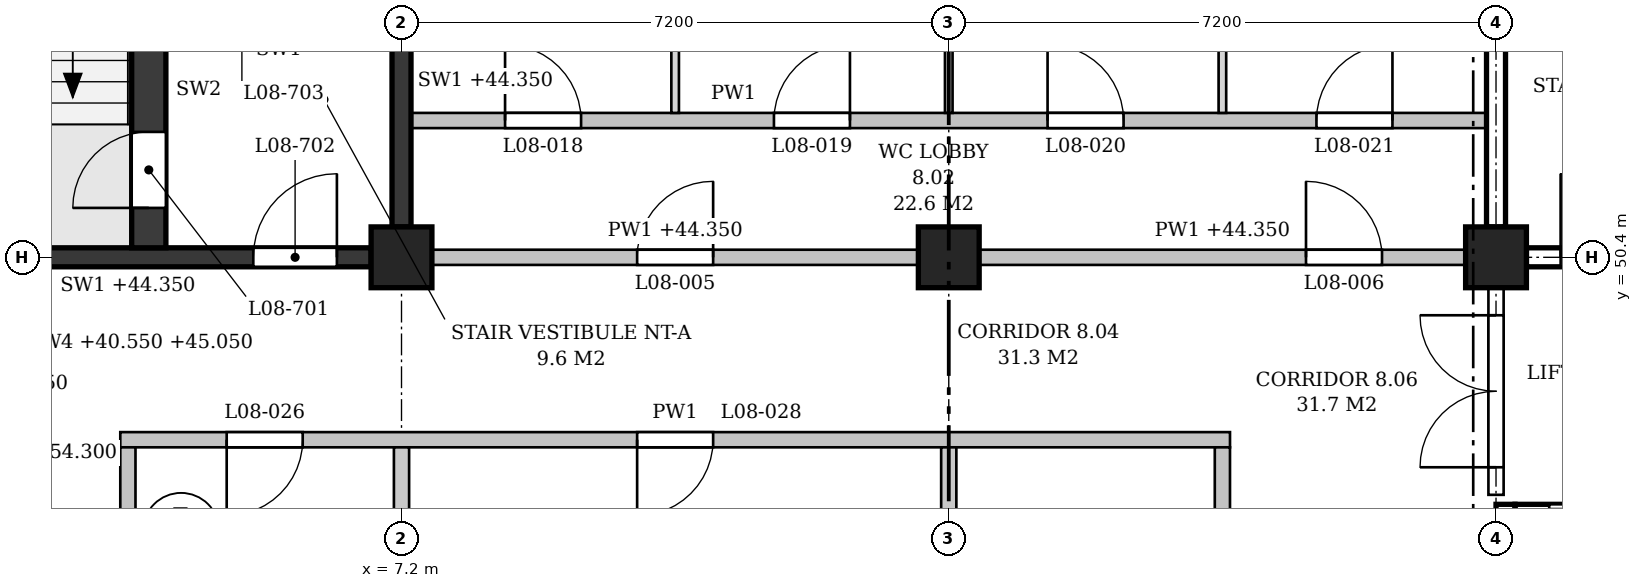
"""IFC4 building model, lengths in metres.
Left out: names, types, materials, properties, quantities, classifications, styles, units other than length and angle.
Written with IfcOpenShell. Run it as: python <this file> out.ifc"""

import sys

from ifc_helpers import new_model, si_unit, direction, frame, frame_2d, origin, origin_2d, place, context, subcontext, project, spatial, polyline, rectangle, outline, extrude, element, fill, save


model = new_model("IFC4")
c1 = context("Model", 3, precision=1e-05, world=origin(), true_north=direction((0.0, 1.0)))
c2 = subcontext(c1, "Body", "Model", "MODEL_VIEW")
j1 = project(units=[si_unit("LENGTHUNIT", "METRE"), si_unit("PLANEANGLEUNIT", "RADIAN")], contexts=[c1])
p1 = place(None, origin())
s1 = spatial("IfcSite", under=j1, at=p1, CompositionType="ELEMENT")
p2 = place(p1, origin())
s2 = spatial("IfcBuilding", under=s1, at=p2, CompositionType="ELEMENT")
p3 = place(p2, frame((0.0, 0.0, 40.8)))
s3 = spatial("IfcBuildingStorey", under=s2, at=p3, CompositionType="ELEMENT", Elevation=40.8)
for number, where, z_axis, x_axis in (
    (1, (7.2, 50.4, 0.0), (0.0, 0.0, 1.0), (1.0, 0.0, 0.0)),
    (2, (14.4, 50.4, 0.0), (0.0, 0.0, 1.0), (1.0, 0.0, 0.0)),
    (3, (21.6, 50.4, 0.0), (0.0, 0.0, 1.0), (1.0, 0.0, 0.0)),
):
    element("IfcColumn", number, at=place(p3, frame(where, z_axis=z_axis, x_axis=x_axis)), inside=s3, PredefinedType="COLUMN", context=c2, shape_type="SweptSolid", body=[
        extrude(rectangle(XDim=0.8, YDim=0.8, at=origin_2d()), origin(), (0.0, 0.0, 1.0), 4.5),
    ])
p4 = place(p3, frame((0.4, 50.4, 0.0), z_axis=(0.0, 0.0, 1.0), x_axis=(1.0, 0.0, 0.0)))
e4 = element("IfcWall", 4, at=p4, inside=s3, PredefinedType="SHEAR", context=c2, shape_type="SweptSolid", body=[
    extrude(rectangle(XDim=6.4, YDim=0.25, at=frame_2d((3.2, 0.0))), origin(), (0.0, 0.0, 1.0), 3.55),
])
p5 = place(p4, frame((4.85, 0.0, 0.0)))
e5 = element("IfcOpeningElement", 5, at=p5, cuts=e4, PredefinedType="OPENING", context=c2, shape_type="SweptSolid", body=[
    extrude(rectangle(XDim=1.1, YDim=2.1, at=frame_2d((0.55, 1.05))), frame((0.0, 0.135, 0.0), z_axis=(0.0, -1.0, 0.0), x_axis=(1.0, 0.0, 0.0)), (0.0, 0.0, 1.0), 0.27),
])
p6 = place(p3, frame((7.2, 50.8, 0.0), z_axis=(0.0, 0.0, 1.0), x_axis=(0.0, 1.0, 0.0)))
e6 = element("IfcWall", 6, at=p6, inside=s3, PredefinedType="SHEAR", context=c2, shape_type="SweptSolid", body=[
    extrude(rectangle(XDim=6.4, YDim=0.25, at=frame_2d((3.2, 0.0))), origin(), (0.0, 0.0, 1.0), 3.55),
])
p7 = place(p3, frame((3.875, 50.525, 0.0), z_axis=(0.0, 0.0, 1.0), x_axis=(0.0, 1.0, 0.0)))
e7 = element("IfcWall", 7, at=p7, inside=s3, PredefinedType="SHEAR", context=c2, shape_type="SweptSolid", body=[
    extrude(rectangle(XDim=6.925, YDim=0.45, at=frame_2d((3.462, 0.0))), origin(), (0.0, 0.0, 1.0), 4.25),
])
p8 = place(p7, frame((0.525, 0.0, 0.0)))
e8 = element("IfcOpeningElement", 8, at=p8, cuts=e7, PredefinedType="OPENING", context=c2, shape_type="SweptSolid", body=[
    extrude(rectangle(XDim=1.0, YDim=2.1, at=frame_2d((0.5, 1.05))), frame((0.0, 0.235, 0.0), z_axis=(0.0, -1.0, 0.0), x_axis=(1.0, 0.0, 0.0)), (0.0, 0.0, 1.0), 0.47),
])
p9 = place(p3, frame((22.0, 50.4, 0.0), z_axis=(0.0, 0.0, 1.0), x_axis=(1.0, 0.0, 0.0)))
e9 = element("IfcWall", 9, at=p9, inside=s3, PredefinedType="SHEAR", context=c2, shape_type="SweptSolid", body=[
    extrude(rectangle(XDim=6.4, YDim=0.25, at=frame_2d((3.2, 0.0))), origin(), (0.0, 0.0, 1.0), 3.55),
])
p10 = place(p9, frame((0.45, 0.0, 0.0)))
e10 = element("IfcOpeningElement", 10, at=p10, cuts=e9, PredefinedType="OPENING", context=c2, shape_type="SweptSolid", body=[
    extrude(rectangle(XDim=1.1, YDim=2.1, at=frame_2d((0.55, 1.05))), frame((0.0, 0.135, 0.0), z_axis=(0.0, -1.0, 0.0), x_axis=(1.0, 0.0, 0.0)), (0.0, 0.0, 1.0), 0.27),
])
p11 = place(p3, frame((21.6, 50.8, 0.0), z_axis=(0.0, 0.0, 1.0), x_axis=(0.0, 1.0, 0.0)))
e11 = element("IfcWall", 11, at=p11, inside=s3, PredefinedType="SHEAR", context=c2, shape_type="SweptSolid", body=[
    extrude(rectangle(XDim=6.4, YDim=0.25, at=frame_2d((3.2, 0.0))), origin(), (0.0, 0.0, 1.0), 3.55),
])
p12 = place(p3, frame((21.725, 43.6, -0.25), z_axis=(0.0, 0.0, 1.0), x_axis=(0.0, 1.0, 0.0)))
e12 = element("IfcWall", 12, at=p12, inside=s3, PredefinedType="SHEAR", context=c2, shape_type="SweptSolid", body=[
    extrude(rectangle(XDim=3.55, YDim=0.25, at=frame_2d((1.775, 0.0))), origin(), (0.0, 0.0, 1.0), 3.8),
])
p13 = place(p3, frame((21.85, 47.025, -0.25), z_axis=(0.0, 0.0, 1.0), x_axis=(1.0, 0.0, 0.0)))
e13 = element("IfcWall", 13, at=p13, inside=s3, PredefinedType="SHEAR", context=c2, shape_type="SweptSolid", body=[
    extrude(rectangle(XDim=2.0, YDim=0.25, at=frame_2d((1.0, 0.0))), origin(), (0.0, 0.0, 1.0), 4.5),
])
p14 = place(p13, frame((0.45, 0.0, 0.25)))
e14 = element("IfcOpeningElement", 14, at=p14, cuts=e13, PredefinedType="OPENING", context=c2, shape_type="SweptSolid", body=[
    extrude(rectangle(XDim=1.1, YDim=2.1, at=frame_2d((0.55, 1.05))), frame((0.0, 0.135, 0.0), z_axis=(0.0, -1.0, 0.0), x_axis=(1.0, 0.0, 0.0)), (0.0, 0.0, 1.0), 0.27),
])
p15 = place(p3, frame((3.5, 48.0, 0.0), z_axis=(0.0, 0.0, 1.0), x_axis=(1.0, 0.0, 0.0)))
e15 = element("IfcWall", 15, at=p15, inside=s3, PredefinedType="PARTITIONING", context=c2, shape_type="SweptSolid", body=[
    extrude(outline(polyline([(0.0, 0.0), (14.6, 0.0), (14.6, 4.25), (11.125, 4.25), (11.125, 3.55), (10.675, 3.55), (10.675, 4.25), (3.925, 4.25), (3.925, 3.55), (3.475, 3.55), (3.475, 4.25), (0.0, 4.25), (0.0, 0.0)])), frame((0.0, 0.1, 0.0), z_axis=(0.0, -1.0, 0.0), x_axis=(1.0, 0.0, 0.0)), (0.0, 0.0, 1.0), 0.2),
])
p16 = place(p15, frame((1.4, 0.0, 0.0)))
e16 = element("IfcOpeningElement", 16, at=p16, cuts=e15, PredefinedType="OPENING", context=c2, shape_type="SweptSolid", body=[
    extrude(rectangle(XDim=1.0, YDim=2.1, at=frame_2d((0.5, 1.05))), frame((0.0, 0.11, 0.0), z_axis=(0.0, -1.0, 0.0), x_axis=(1.0, 0.0, 0.0)), (0.0, 0.0, 1.0), 0.22),
])
p17 = place(p15, frame((6.8, 0.0, 0.0)))
e17 = element("IfcOpeningElement", 17, at=p17, cuts=e15, PredefinedType="OPENING", context=c2, shape_type="SweptSolid", body=[
    extrude(rectangle(XDim=1.0, YDim=2.1, at=frame_2d((0.5, 1.05))), frame((0.0, 0.11, 0.0), z_axis=(0.0, -1.0, 0.0), x_axis=(1.0, 0.0, 0.0)), (0.0, 0.0, 1.0), 0.22),
])
p18 = place(p3, frame((7.6, 50.4, 0.0), z_axis=(0.0, 0.0, 1.0), x_axis=(1.0, 0.0, 0.0)))
e18 = element("IfcWall", 18, at=p18, inside=s3, PredefinedType="PARTITIONING", context=c2, shape_type="SweptSolid", body=[
    extrude(rectangle(XDim=6.4, YDim=0.2, at=frame_2d((3.2, 0.0))), origin(), (0.0, 0.0, 1.0), 3.55),
])
p19 = place(p18, frame((2.7, 0.0, 0.0)))
e19 = element("IfcOpeningElement", 19, at=p19, cuts=e18, PredefinedType="OPENING", context=c2, shape_type="SweptSolid", body=[
    extrude(rectangle(XDim=1.0, YDim=2.1, at=frame_2d((0.5, 1.05))), frame((0.0, 0.11, 0.0), z_axis=(0.0, -1.0, 0.0), x_axis=(1.0, 0.0, 0.0)), (0.0, 0.0, 1.0), 0.22),
])
p20 = place(p3, frame((14.8, 50.4, 0.0), z_axis=(0.0, 0.0, 1.0), x_axis=(1.0, 0.0, 0.0)))
e20 = element("IfcWall", 20, at=p20, inside=s3, PredefinedType="PARTITIONING", context=c2, shape_type="SweptSolid", body=[
    extrude(rectangle(XDim=6.4, YDim=0.2, at=frame_2d((3.2, 0.0))), origin(), (0.0, 0.0, 1.0), 3.55),
])
p21 = place(p20, frame((4.3, 0.0, 0.0)))
e21 = element("IfcOpeningElement", 21, at=p21, cuts=e20, PredefinedType="OPENING", context=c2, shape_type="SweptSolid", body=[
    extrude(rectangle(XDim=1.0, YDim=2.1, at=frame_2d((0.5, 1.05))), frame((0.0, 0.11, 0.0), z_axis=(0.0, -1.0, 0.0), x_axis=(1.0, 0.0, 0.0)), (0.0, 0.0, 1.0), 0.22),
])
p22 = place(p3, frame((7.325, 52.2, 0.0), z_axis=(0.0, 0.0, 1.0), x_axis=(1.0, 0.0, 0.0)))
e22 = element("IfcWall", 22, at=p22, inside=s3, PredefinedType="PARTITIONING", context=c2, shape_type="SweptSolid", body=[
    extrude(outline(polyline([(0.0, 0.0), (14.15, 0.0), (14.15, 3.55), (14.05, 3.55), (14.05, 4.25), (7.3, 4.25), (7.3, 3.55), (6.85, 3.55), (6.85, 4.25), (0.1, 4.25), (0.1, 3.55), (0.0, 3.55), (0.0, 0.0)])), frame((0.0, 0.1, 0.0), z_axis=(0.0, -1.0, 0.0), x_axis=(1.0, 0.0, 0.0)), (0.0, 0.0, 1.0), 0.2),
])
p23 = place(p22, frame((1.238, 0.0, 0.0)))
e23 = element("IfcOpeningElement", 23, at=p23, cuts=e22, PredefinedType="OPENING", context=c2, shape_type="SweptSolid", body=[
    extrude(rectangle(XDim=1.0, YDim=2.1, at=frame_2d((0.5, 1.05))), frame((0.0, 0.11, 0.0), z_axis=(0.0, -1.0, 0.0), x_axis=(1.0, 0.0, 0.0)), (0.0, 0.0, 1.0), 0.22),
])
p24 = place(p22, frame((4.775, 0.0, 0.0)))
e24 = element("IfcOpeningElement", 24, at=p24, cuts=e22, PredefinedType="OPENING", context=c2, shape_type="SweptSolid", body=[
    extrude(rectangle(XDim=1.0, YDim=2.1, at=frame_2d((0.5, 1.05))), frame((0.0, 0.11, 0.0), z_axis=(0.0, -1.0, 0.0), x_axis=(1.0, 0.0, 0.0)), (0.0, 0.0, 1.0), 0.22),
])
p25 = place(p22, frame((8.375, 0.0, 0.0)))
e25 = element("IfcOpeningElement", 25, at=p25, cuts=e22, PredefinedType="OPENING", context=c2, shape_type="SweptSolid", body=[
    extrude(rectangle(XDim=1.0, YDim=2.1, at=frame_2d((0.5, 1.05))), frame((0.0, 0.11, 0.0), z_axis=(0.0, -1.0, 0.0), x_axis=(1.0, 0.0, 0.0)), (0.0, 0.0, 1.0), 0.22),
])
p26 = place(p22, frame((11.913, 0.0, 0.0)))
e26 = element("IfcOpeningElement", 26, at=p26, cuts=e22, PredefinedType="OPENING", context=c2, shape_type="SweptSolid", body=[
    extrude(rectangle(XDim=1.0, YDim=2.1, at=frame_2d((0.5, 1.05))), frame((0.0, 0.11, 0.0), z_axis=(0.0, -1.0, 0.0), x_axis=(1.0, 0.0, 0.0)), (0.0, 0.0, 1.0), 0.22),
])
p27 = place(p3, frame((3.6, 46.8, 0.0), z_axis=(0.0, 0.0, 1.0), x_axis=(0.0, 1.0, 0.0)))
e27 = element("IfcWall", 27, at=p27, inside=s3, PredefinedType="PARTITIONING", context=c2, shape_type="SweptSolid", body=[
    extrude(rectangle(XDim=1.1, YDim=0.2, at=frame_2d((0.55, 0.0))), origin(), (0.0, 0.0, 1.0), 4.25),
])
p28 = place(p3, frame((7.2, 43.6, 0.0), z_axis=(0.0, 0.0, 1.0), x_axis=(0.0, 1.0, 0.0)))
e28 = element("IfcWall", 28, at=p28, inside=s3, PredefinedType="PARTITIONING", context=c2, shape_type="SweptSolid", body=[
    extrude(rectangle(XDim=4.3, YDim=0.2, at=frame_2d((2.15, 0.0))), origin(), (0.0, 0.0, 1.0), 3.55),
])
p29 = place(p3, frame((10.8, 52.3, 0.0), z_axis=(0.0, 0.0, 1.0), x_axis=(0.0, 1.0, 0.0)))
e29 = element("IfcWall", 29, at=p29, inside=s3, PredefinedType="PARTITIONING", context=c2, shape_type="SweptSolid", body=[
    extrude(rectangle(XDim=5.15, YDim=0.1, at=frame_2d((2.575, 0.0))), origin(), (0.0, 0.0, 1.0), 3.55),
])
p30 = place(p3, frame((14.4, 43.6, 0.0), z_axis=(0.0, 0.0, 1.0), x_axis=(0.0, 1.0, 0.0)))
e30 = element("IfcWall", 30, at=p30, inside=s3, PredefinedType="PARTITIONING", context=c2, shape_type="SweptSolid", body=[
    extrude(rectangle(XDim=4.3, YDim=0.2, at=frame_2d((2.15, 0.0))), origin(), (0.0, 0.0, 1.0), 3.55),
])
p31 = place(p3, frame((14.4, 52.3, 0.0), z_axis=(0.0, 0.0, 1.0), x_axis=(0.0, 1.0, 0.0)))
e31 = element("IfcWall", 31, at=p31, inside=s3, PredefinedType="PARTITIONING", context=c2, shape_type="SweptSolid", body=[
    extrude(rectangle(XDim=4.9, YDim=0.1, at=frame_2d((2.45, 0.0))), origin(), (0.0, 0.0, 1.0), 3.55),
])
p32 = place(p3, frame((18.0, 40.9, 0.0), z_axis=(0.0, 0.0, 1.0), x_axis=(0.0, 1.0, 0.0)))
e32 = element("IfcWall", 32, at=p32, inside=s3, PredefinedType="PARTITIONING", context=c2, shape_type="SweptSolid", body=[
    extrude(outline(polyline([(0.0, 0.0), (7.0, 0.0), (7.0, 4.25), (2.525, 4.25), (2.525, 3.55), (2.075, 3.55), (2.075, 4.25), (0.0, 4.25), (0.0, 0.0)])), frame((0.0, 0.1, 0.0), z_axis=(0.0, -1.0, 0.0), x_axis=(1.0, 0.0, 0.0)), (0.0, 0.0, 1.0), 0.2),
])
p33 = place(p32, frame((3.0, 0.0, 0.0)))
e33 = element("IfcOpeningElement", 33, at=p33, cuts=e32, PredefinedType="OPENING", context=c2, shape_type="SweptSolid", body=[
    extrude(rectangle(XDim=1.0, YDim=2.1, at=frame_2d((0.5, 1.05))), frame((0.0, 0.11, 0.0), z_axis=(0.0, -1.0, 0.0), x_axis=(1.0, 0.0, 0.0)), (0.0, 0.0, 1.0), 0.22),
])
p34 = place(p3, frame((18.0, 52.3, 0.0), z_axis=(0.0, 0.0, 1.0), x_axis=(0.0, 1.0, 0.0)))
e34 = element("IfcWall", 34, at=p34, inside=s3, PredefinedType="PARTITIONING", context=c2, shape_type="SweptSolid", body=[
    extrude(rectangle(XDim=5.15, YDim=0.1, at=frame_2d((2.575, 0.0))), origin(), (0.0, 0.0, 1.0), 3.55),
])
p35 = place(p3, frame((21.6, 47.275, 0.0), z_axis=(0.0, 0.0, 1.0), x_axis=(0.0, 1.0, 0.0)))
e35 = element("IfcWall", 35, at=p35, inside=s3, PredefinedType="PARTITIONING", context=c2, shape_type="SweptSolid", body=[
    extrude(rectangle(XDim=2.725, YDim=0.2, at=frame_2d((1.363, 0.0))), origin(), (0.0, 0.0, 1.0), 3.55),
])
p36 = place(p35, frame((0.363, 0.0, 0.0)))
e36 = element("IfcOpeningElement", 36, at=p36, cuts=e35, PredefinedType="OPENING", context=c2, shape_type="SweptSolid", body=[
    extrude(rectangle(XDim=2.0, YDim=2.4, at=frame_2d((1.0, 1.2))), frame((0.0, 0.11, 0.0), z_axis=(0.0, -1.0, 0.0), x_axis=(1.0, 0.0, 0.0)), (0.0, 0.0, 1.0), 0.22),
])
p37 = place(p8, origin())
e37 = element("IfcDoor", 37, at=p37, inside=s3, OperationType="SINGLE_SWING_LEFT", PredefinedType="DOOR", context=c2, shape_type="SweptSolid", body=[
    extrude(rectangle(XDim=1.0, YDim=2.1, at=frame_2d((0.5, 1.05))), frame((0.0, 0.025, 0.0), z_axis=(0.0, -1.0, 0.0), x_axis=(1.0, 0.0, 0.0)), (0.0, 0.0, 1.0), 0.05),
])
fill(e8, e37)
p38 = place(p5, origin())
e38 = element("IfcDoor", 38, at=p38, inside=s3, OperationType="SINGLE_SWING_RIGHT", PredefinedType="DOOR", context=c2, shape_type="SweptSolid", body=[
    extrude(rectangle(XDim=1.1, YDim=2.1, at=frame_2d((0.55, 1.05))), frame((0.0, 0.025, 0.0), z_axis=(0.0, -1.0, 0.0), x_axis=(1.0, 0.0, 0.0)), (0.0, 0.0, 1.0), 0.05),
])
fill(e5, e38)
p39 = place(p10, origin())
e39 = element("IfcDoor", 39, at=p39, inside=s3, OperationType="SINGLE_SWING_LEFT", PredefinedType="DOOR", context=c2, shape_type="SweptSolid", body=[
    extrude(rectangle(XDim=1.1, YDim=2.1, at=frame_2d((0.55, 1.05))), frame((0.0, 0.025, 0.0), z_axis=(0.0, -1.0, 0.0), x_axis=(1.0, 0.0, 0.0)), (0.0, 0.0, 1.0), 0.05),
])
fill(e10, e39)
p40 = place(p36, origin())
e40 = element("IfcDoor", 40, at=p40, inside=s3, OperationType="DOUBLE_DOOR_SINGLE_SWING", PredefinedType="DOOR", context=c2, shape_type="SweptSolid", body=[
    extrude(rectangle(XDim=2.0, YDim=2.4, at=frame_2d((1.0, 1.2))), frame((0.0, 0.025, 0.0), z_axis=(0.0, -1.0, 0.0), x_axis=(1.0, 0.0, 0.0)), (0.0, 0.0, 1.0), 0.05),
])
fill(e36, e40)
p41 = place(p19, origin())
e41 = element("IfcDoor", 41, at=p41, inside=s3, OperationType="SINGLE_SWING_RIGHT", PredefinedType="DOOR", context=c2, shape_type="SweptSolid", body=[
    extrude(rectangle(XDim=1.0, YDim=2.1, at=frame_2d((0.5, 1.05))), frame((0.0, 0.025, 0.0), z_axis=(0.0, -1.0, 0.0), x_axis=(1.0, 0.0, 0.0)), (0.0, 0.0, 1.0), 0.05),
])
fill(e19, e41)
p42 = place(p21, origin())
e42 = element("IfcDoor", 42, at=p42, inside=s3, OperationType="SINGLE_SWING_LEFT", PredefinedType="DOOR", context=c2, shape_type="SweptSolid", body=[
    extrude(rectangle(XDim=1.0, YDim=2.1, at=frame_2d((0.5, 1.05))), frame((0.0, 0.025, 0.0), z_axis=(0.0, -1.0, 0.0), x_axis=(1.0, 0.0, 0.0)), (0.0, 0.0, 1.0), 0.05),
])
fill(e21, e42)
p43 = place(p23, origin())
e43 = element("IfcDoor", 43, at=p43, inside=s3, OperationType="SINGLE_SWING_LEFT", PredefinedType="DOOR", context=c2, shape_type="SweptSolid", body=[
    extrude(rectangle(XDim=1.0, YDim=2.1, at=frame_2d((0.5, 1.05))), frame((0.0, 0.025, 0.0), z_axis=(0.0, -1.0, 0.0), x_axis=(1.0, 0.0, 0.0)), (0.0, 0.0, 1.0), 0.05),
])
fill(e23, e43)
p44 = place(p24, origin())
e44 = element("IfcDoor", 44, at=p44, inside=s3, OperationType="SINGLE_SWING_RIGHT", PredefinedType="DOOR", context=c2, shape_type="SweptSolid", body=[
    extrude(rectangle(XDim=1.0, YDim=2.1, at=frame_2d((0.5, 1.05))), frame((0.0, 0.025, 0.0), z_axis=(0.0, -1.0, 0.0), x_axis=(1.0, 0.0, 0.0)), (0.0, 0.0, 1.0), 0.05),
])
fill(e24, e44)
p45 = place(p25, origin())
e45 = element("IfcDoor", 45, at=p45, inside=s3, OperationType="SINGLE_SWING_LEFT", PredefinedType="DOOR", context=c2, shape_type="SweptSolid", body=[
    extrude(rectangle(XDim=1.0, YDim=2.1, at=frame_2d((0.5, 1.05))), frame((0.0, 0.025, 0.0), z_axis=(0.0, -1.0, 0.0), x_axis=(1.0, 0.0, 0.0)), (0.0, 0.0, 1.0), 0.05),
])
fill(e25, e45)
p46 = place(p26, origin())
e46 = element("IfcDoor", 46, at=p46, inside=s3, OperationType="SINGLE_SWING_RIGHT", PredefinedType="DOOR", context=c2, shape_type="SweptSolid", body=[
    extrude(rectangle(XDim=1.0, YDim=2.1, at=frame_2d((0.5, 1.05))), frame((0.0, 0.025, 0.0), z_axis=(0.0, -1.0, 0.0), x_axis=(1.0, 0.0, 0.0)), (0.0, 0.0, 1.0), 0.05),
])
fill(e26, e46)
p47 = place(p16, frame((1.0, 0.0, 0.0), z_axis=(0.0, 0.0, 1.0), x_axis=(-1.0, 0.0, 0.0)))
e47 = element("IfcDoor", 47, at=p47, inside=s3, OperationType="SINGLE_SWING_RIGHT", PredefinedType="DOOR", context=c2, shape_type="SweptSolid", body=[
    extrude(rectangle(XDim=1.0, YDim=2.1, at=frame_2d((0.5, 1.05))), frame((0.0, 0.025, 0.0), z_axis=(0.0, -1.0, 0.0), x_axis=(1.0, 0.0, 0.0)), (0.0, 0.0, 1.0), 0.05),
])
fill(e16, e47)
p48 = place(p17, frame((1.0, 0.0, 0.0), z_axis=(0.0, 0.0, 1.0), x_axis=(-1.0, 0.0, 0.0)))
e48 = element("IfcDoor", 48, at=p48, inside=s3, OperationType="SINGLE_SWING_RIGHT", PredefinedType="DOOR", context=c2, shape_type="SweptSolid", body=[
    extrude(rectangle(XDim=1.0, YDim=2.1, at=frame_2d((0.5, 1.05))), frame((0.0, 0.025, 0.0), z_axis=(0.0, -1.0, 0.0), x_axis=(1.0, 0.0, 0.0)), (0.0, 0.0, 1.0), 0.05),
])
fill(e17, e48)
save(model, sys.argv[1])
